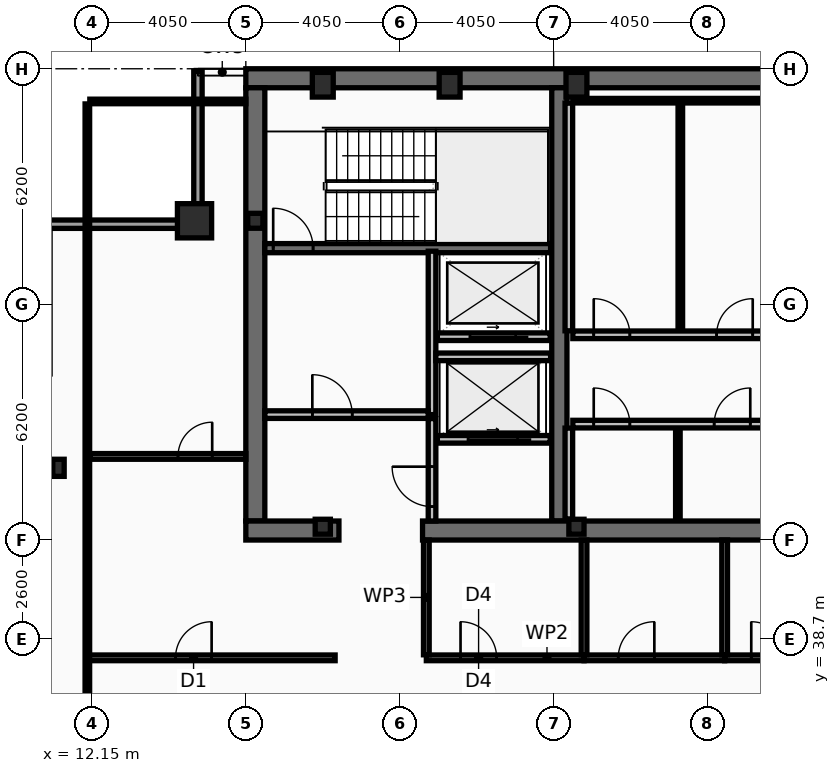
"""IFC4 building model, lengths in metres.
Left out: names, types, materials, properties, quantities, classifications, styles, units other than length and angle.
Written with IfcOpenShell. Run it as: python <this file> out.ifc"""

import sys

from ifc_helpers import new_model, si_unit, direction, frame, frame_2d, origin, origin_2d, place, context, subcontext, project, spatial, rectangle, hollow_rectangle, i_section, extrude, element, fill, save


model = new_model("IFC4")
c1 = context("Model", 3, precision=1e-05, world=origin(), true_north=direction((0.0, 1.0)))
c2 = subcontext(c1, "Body", "Model", "MODEL_VIEW")
j1 = project(units=[si_unit("LENGTHUNIT", "METRE"), si_unit("PLANEANGLEUNIT", "RADIAN")], contexts=[c1])
p1 = place(None, origin())
s1 = spatial("IfcSite", under=j1, at=p1, CompositionType="ELEMENT")
p2 = place(p1, origin())
s2 = spatial("IfcBuilding", under=s1, at=p2, CompositionType="ELEMENT")
p3 = place(p2, frame((0.0, 0.0, 325.4)))
s3 = spatial("IfcBuildingStorey", under=s2, at=p3, CompositionType="ELEMENT", Elevation=325.4)
p4 = place(p3, frame((16.2, 53.45, 0.0), z_axis=(0.0, 0.0, 1.0), x_axis=(1.0, 0.0, 0.0)))
e1 = element("IfcWall", 1, at=p4, inside=s3, PredefinedType="SHEAR", context=c2, shape_type="SweptSolid", body=[
    extrude(rectangle(XDim=40.5, YDim=0.5, at=frame_2d((20.25, 0.0))), origin(), (0.0, 0.0, 1.0), 3.44),
])
p5 = place(p3, frame((16.45, 41.8, 0.0), z_axis=(0.0, 0.0, 1.0), x_axis=(0.0, 1.0, 0.0)))
e2 = element("IfcWall", 2, at=p5, inside=s3, PredefinedType="SHEAR", context=c2, shape_type="SweptSolid", body=[
    extrude(rectangle(XDim=11.4, YDim=0.5, at=frame_2d((5.7, 0.0))), origin(), (0.0, 0.0, 1.0), 3.44),
])
p6 = place(p3, frame((24.45, 41.8, 0.0), z_axis=(0.0, 0.0, 1.0), x_axis=(0.0, 1.0, 0.0)))
e3 = element("IfcWall", 3, at=p6, inside=s3, PredefinedType="SHEAR", context=c2, shape_type="SweptSolid", body=[
    extrude(rectangle(XDim=11.4, YDim=0.4, at=frame_2d((5.7, 0.0))), origin(), (0.0, 0.0, 1.0), 3.44),
])
p7 = place(p3, frame((18.65, 41.55, 0.0), z_axis=(0.0, 0.0, 1.0), x_axis=(-1.0, 0.0, 0.0)))
e4 = element("IfcWall", 4, at=p7, inside=s3, PredefinedType="SHEAR", context=c2, shape_type="SweptSolid", body=[
    extrude(rectangle(XDim=2.45, YDim=0.5, at=frame_2d((1.225, 0.0))), origin(), (0.0, 0.0, 1.0), 3.44),
])
p8 = place(p3, frame((32.3, 41.55, 0.0), z_axis=(0.0, 0.0, 1.0), x_axis=(-1.0, 0.0, 0.0)))
e5 = element("IfcWall", 5, at=p8, inside=s3, PredefinedType="SHEAR", context=c2, shape_type="SweptSolid", body=[
    extrude(rectangle(XDim=11.45, YDim=0.5, at=frame_2d((5.725, 0.0))), origin(), (0.0, 0.0, 1.0), 3.44),
])
p9 = place(p3, frame((16.7, 48.98, 0.0), z_axis=(0.0, 0.0, 1.0), x_axis=(1.0, 0.0, 0.0)))
e6 = element("IfcWall", 6, at=p9, inside=s3, PredefinedType="SHEAR", context=c2, shape_type="SweptSolid", body=[
    extrude(rectangle(XDim=7.52, YDim=0.24, at=frame_2d((3.76, 0.0))), origin(), (0.0, 0.0, 1.0), 3.44),
])
p10 = place(p9, frame((0.22, 0.0, 0.0)))
e7 = element("IfcOpeningElement", 7, at=p10, cuts=e6, PredefinedType="OPENING", context=c2, shape_type="SweptSolid", body=[
    extrude(rectangle(XDim=1.05, YDim=2.15, at=frame_2d((0.525, 1.075))), frame((0.0, 0.13, 0.0), z_axis=(0.0, -1.0, 0.0), x_axis=(1.0, 0.0, 0.0)), (0.0, 0.0, 1.0), 0.26),
])
p11 = place(p3, frame((14.85, 49.7, 0.0), z_axis=(0.0, 0.0, 1.0), x_axis=(1.0, 0.0, 0.0)))
e8 = element("IfcColumn", 8, at=p11, inside=s3, PredefinedType="COLUMN", context=c2, shape_type="SweptSolid", body=[
    extrude(hollow_rectangle(XDim=0.9, YDim=0.9, WallThickness=0.05, at=origin_2d()), origin(), (0.0, 0.0, 1.0), 3.6),
])
for number, where, z_axis, x_axis in (
    (9, (18.225, 53.28, 0.0), (0.0, 0.0, 1.0), (1.0, 0.0, 0.0)),
    (10, (21.562, 53.28, 0.0), (0.0, 0.0, 1.0), (1.0, 0.0, 0.0)),
    (11, (24.9, 53.28, 0.0), (0.0, 0.0, 1.0), (1.0, 0.0, 0.0)),
):
    element("IfcColumn", number, at=place(p3, frame(where, z_axis=z_axis, x_axis=x_axis)), inside=s3, PredefinedType="COLUMN", context=c2, shape_type="SweptSolid", body=[
        extrude(hollow_rectangle(XDim=0.55, YDim=0.65, WallThickness=0.04, at=origin_2d()), origin(), (0.0, 0.0, 1.0), 3.6),
    ])
p12 = place(p3, frame((11.27, 43.2, 0.0), z_axis=(0.0, 0.0, 1.0), x_axis=(1.0, 0.0, 0.0)))
e12 = element("IfcColumn", 12, at=p12, inside=s3, PredefinedType="COLUMN", context=c2, shape_type="SweptSolid", body=[
    extrude(i_section(OverallWidth=0.3, OverallDepth=0.45, WebThickness=0.014, FlangeThickness=0.026, at=origin_2d()), origin(), (0.0, 0.0, 1.0), 3.6),
])
for number, where, z_axis, x_axis in (
    (13, (16.45, 49.7, 0.0), (0.0, 0.0, 1.0), (1.0, 0.0, 0.0)),
    (14, (18.225, 41.65, 0.0), (0.0, 0.0, 1.0), (1.0, 0.0, 0.0)),
    (15, (24.9, 41.65, 0.0), (0.0, 0.0, 1.0), (1.0, 0.0, 0.0)),
):
    element("IfcColumn", number, at=place(p3, frame(where, z_axis=z_axis, x_axis=x_axis)), inside=s3, PredefinedType="COLUMN", context=c2, shape_type="SweptSolid", body=[
        extrude(i_section(OverallWidth=0.399, OverallDepth=0.393, WebThickness=0.023, FlangeThickness=0.037, at=origin_2d()), origin(), (0.0, 0.0, 1.0), 3.6),
    ])
p13 = place(p3, frame((10.83, 49.61, 0.0), z_axis=(0.0, 0.0, 1.0), x_axis=(1.0, 0.0, 0.0)))
e16 = element("IfcWall", 16, at=p13, inside=s3, PredefinedType="SOLIDWALL", context=c2, shape_type="SweptSolid", body=[
    extrude(rectangle(XDim=4.22, YDim=0.22, at=frame_2d((2.11, 0.0))), origin(), (0.0, 0.0, 1.0), 2.88),
])
p14 = place(p3, frame((14.94, 49.72, 0.0), z_axis=(0.0, 0.0, 1.0), x_axis=(0.0, 1.0, 0.0)))
e17 = element("IfcWall", 17, at=p14, inside=s3, PredefinedType="SOLIDWALL", context=c2, shape_type="SweptSolid", body=[
    extrude(rectangle(XDim=3.91, YDim=0.22, at=frame_2d((1.955, 0.0))), origin(), (0.0, 0.0, 1.0), 2.88),
])
p15 = place(p3, frame((24.21, 43.95, 0.0), z_axis=(0.0, 0.0, 1.0), x_axis=(-1.0, 0.0, 0.0)))
e18 = element("IfcWall", 18, at=p15, inside=s3, PredefinedType="PARTITIONING", context=c2, shape_type="SweptSolid", body=[
    extrude(rectangle(XDim=2.97, YDim=0.2, at=frame_2d((1.485, 0.0))), origin(), (0.0, 0.0, 1.0), 3.44),
])
p16 = place(p15, frame((0.86, 0.0, 0.0)))
e19 = element("IfcOpeningElement", 19, at=p16, cuts=e18, PredefinedType="OPENING", context=c2, shape_type="SweptSolid", body=[
    extrude(rectangle(XDim=1.3, YDim=2.18, at=frame_2d((0.65, 1.09))), frame((0.0, 0.11, 0.0), z_axis=(0.0, -1.0, 0.0), x_axis=(1.0, 0.0, 0.0)), (0.0, 0.0, 1.0), 0.22),
])
p17 = place(p3, frame((24.21, 46.65, 0.0), z_axis=(0.0, 0.0, 1.0), x_axis=(-1.0, 0.0, 0.0)))
e20 = element("IfcWall", 20, at=p17, inside=s3, PredefinedType="PARTITIONING", context=c2, shape_type="SweptSolid", body=[
    extrude(rectangle(XDim=2.97, YDim=0.2, at=frame_2d((1.485, 0.0))), origin(), (0.0, 0.0, 1.0), 3.44),
])
p18 = place(p17, frame((0.91, 0.0, 0.0)))
e21 = element("IfcOpeningElement", 21, at=p18, cuts=e20, PredefinedType="OPENING", context=c2, shape_type="SweptSolid", body=[
    extrude(rectangle(XDim=1.2, YDim=2.18, at=frame_2d((0.6, 1.09))), frame((0.0, 0.11, 0.0), z_axis=(0.0, -1.0, 0.0), x_axis=(1.0, 0.0, 0.0)), (0.0, 0.0, 1.0), 0.22),
])
p19 = place(p3, frame((21.1, 44.6, 0.0), z_axis=(0.0, 0.0, 1.0), x_axis=(0.0, 1.0, 0.0)))
e22 = element("IfcWall", 22, at=p19, inside=s3, PredefinedType="PARTITIONING", context=c2, shape_type="SweptSolid", body=[
    extrude(rectangle(XDim=4.3, YDim=0.2, at=frame_2d((2.15, 0.0))), origin(), (0.0, 0.0, 1.0), 3.44),
])
p20 = place(p3, frame((16.7, 44.6, 0.0), z_axis=(0.0, 0.0, 1.0), x_axis=(1.0, 0.0, 0.0)))
e23 = element("IfcWall", 23, at=p20, inside=s3, PredefinedType="PARTITIONING", context=c2, shape_type="SweptSolid", body=[
    extrude(rectangle(XDim=4.3, YDim=0.2, at=frame_2d((2.15, 0.0))), origin(), (0.0, 0.0, 1.0), 3.44),
])
p21 = place(p20, frame((1.25, 0.0, 0.0)))
e24 = element("IfcOpeningElement", 24, at=p21, cuts=e23, PredefinedType="OPENING", context=c2, shape_type="SweptSolid", body=[
    extrude(rectangle(XDim=1.05, YDim=2.15, at=frame_2d((0.525, 1.075))), frame((0.0, 0.11, 0.0), z_axis=(0.0, -1.0, 0.0), x_axis=(1.0, 0.0, 0.0)), (0.0, 0.0, 1.0), 0.22),
])
p22 = place(p3, frame((21.2, 46.12, 0.0), z_axis=(0.0, 0.0, 1.0), x_axis=(1.0, 0.0, 0.0)))
e25 = element("IfcWall", 25, at=p22, inside=s3, PredefinedType="PARTITIONING", context=c2, shape_type="SweptSolid", body=[
    extrude(rectangle(XDim=3.02, YDim=0.2, at=frame_2d((1.51, 0.0))), origin(), (0.0, 0.0, 1.0), 3.44),
])
p23 = place(p3, frame((21.1, 41.8, 0.0), z_axis=(0.0, 0.0, 1.0), x_axis=(0.0, 1.0, 0.0)))
e26 = element("IfcWall", 26, at=p23, inside=s3, PredefinedType="PARTITIONING", context=c2, shape_type="SweptSolid", body=[
    extrude(rectangle(XDim=2.695, YDim=0.2, at=frame_2d((1.348, 0.0))), origin(), (0.0, 0.0, 1.0), 3.44),
])
p24 = place(p23, frame((0.38, 0.0, 0.0)))
e27 = element("IfcOpeningElement", 27, at=p24, cuts=e26, PredefinedType="OPENING", context=c2, shape_type="SweptSolid", body=[
    extrude(rectangle(XDim=1.05, YDim=2.15, at=frame_2d((0.525, 1.075))), frame((0.0, 0.11, 0.0), z_axis=(0.0, -1.0, 0.0), x_axis=(1.0, 0.0, 0.0)), (0.0, 0.0, 1.0), 0.22),
])
p25 = place(p3, frame((24.7, 46.805, 0.0), z_axis=(0.0, 0.0, 1.0), x_axis=(0.0, 1.0, 0.0)))
e28 = element("IfcWall", 28, at=p25, inside=s3, PredefinedType="PARTITIONING", context=c2, shape_type="SweptSolid", body=[
    extrude(rectangle(XDim=5.99, YDim=0.2, at=frame_2d((2.995, 0.0))), origin(), (0.0, 0.0, 1.0), 3.44),
])
p26 = place(p3, frame((24.805, 52.86, 0.0), z_axis=(0.0, 0.0, 1.0), x_axis=(1.0, 0.0, 0.0)))
e29 = element("IfcWall", 29, at=p26, inside=s3, PredefinedType="PARTITIONING", context=c2, shape_type="SweptSolid", body=[
    extrude(rectangle(XDim=7.51, YDim=0.12, at=frame_2d((3.755, 0.0))), origin(), (0.0, 0.0, 1.0), 3.44),
])
p27 = place(p3, frame((27.634, 46.805, 0.0), z_axis=(0.0, 0.0, 1.0), x_axis=(0.0, 1.0, 0.0)))
e30 = element("IfcWall", 30, at=p27, inside=s3, PredefinedType="PARTITIONING", context=c2, shape_type="SweptSolid", body=[
    extrude(rectangle(XDim=5.99, YDim=0.12, at=frame_2d((2.995, 0.0))), origin(), (0.0, 0.0, 1.0), 3.44),
])
p28 = place(p3, frame((24.805, 46.7, 0.0), z_axis=(0.0, 0.0, 1.0), x_axis=(1.0, 0.0, 0.0)))
e31 = element("IfcWall", 31, at=p28, inside=s3, PredefinedType="PARTITIONING", context=c2, shape_type="SweptSolid", body=[
    extrude(rectangle(XDim=7.51, YDim=0.2, at=frame_2d((3.755, 0.0))), origin(), (0.0, 0.0, 1.0), 3.44),
])
p29 = place(p28, frame((0.55, 0.0, 0.0)))
e32 = element("IfcOpeningElement", 32, at=p29, cuts=e31, PredefinedType="OPENING", context=c2, shape_type="SweptSolid", body=[
    extrude(rectangle(XDim=0.95, YDim=2.1, at=frame_2d((0.475, 1.05))), frame((0.0, 0.11, 0.0), z_axis=(0.0, -1.0, 0.0), x_axis=(1.0, 0.0, 0.0)), (0.0, 0.0, 1.0), 0.22),
])
p30 = place(p28, frame((3.784, 0.0, 0.0)))
e33 = element("IfcOpeningElement", 33, at=p30, cuts=e31, PredefinedType="OPENING", context=c2, shape_type="SweptSolid", body=[
    extrude(rectangle(XDim=0.95, YDim=2.1, at=frame_2d((0.475, 1.05))), frame((0.0, 0.11, 0.0), z_axis=(0.0, -1.0, 0.0), x_axis=(1.0, 0.0, 0.0)), (0.0, 0.0, 1.0), 0.22),
])
p31 = place(p3, frame((24.7, 41.85, 0.0), z_axis=(0.0, 0.0, 1.0), x_axis=(0.0, 1.0, 0.0)))
e34 = element("IfcWall", 34, at=p31, inside=s3, PredefinedType="PARTITIONING", context=c2, shape_type="SweptSolid", body=[
    extrude(rectangle(XDim=2.395, YDim=0.2, at=frame_2d((1.198, 0.0))), origin(), (0.0, 0.0, 1.0), 3.44),
])
p32 = place(p3, frame((27.569, 41.85, 0.0), z_axis=(0.0, 0.0, 1.0), x_axis=(0.0, 1.0, 0.0)))
e35 = element("IfcWall", 35, at=p32, inside=s3, PredefinedType="PARTITIONING", context=c2, shape_type="SweptSolid", body=[
    extrude(rectangle(XDim=2.395, YDim=0.12, at=frame_2d((1.198, 0.0))), origin(), (0.0, 0.0, 1.0), 3.44),
])
p33 = place(p3, frame((24.805, 44.35, 0.0), z_axis=(0.0, 0.0, 1.0), x_axis=(1.0, 0.0, 0.0)))
e36 = element("IfcWall", 36, at=p33, inside=s3, PredefinedType="PARTITIONING", context=c2, shape_type="SweptSolid", body=[
    extrude(rectangle(XDim=7.34, YDim=0.2, at=frame_2d((3.67, 0.0))), origin(), (0.0, 0.0, 1.0), 3.44),
])
p34 = place(p33, frame((0.55, 0.0, 0.0)))
e37 = element("IfcOpeningElement", 37, at=p34, cuts=e36, PredefinedType="OPENING", context=c2, shape_type="SweptSolid", body=[
    extrude(rectangle(XDim=0.95, YDim=2.1, at=frame_2d((0.475, 1.05))), frame((0.0, 0.11, 0.0), z_axis=(0.0, -1.0, 0.0), x_axis=(1.0, 0.0, 0.0)), (0.0, 0.0, 1.0), 0.22),
])
p35 = place(p33, frame((3.719, 0.0, 0.0)))
e38 = element("IfcOpeningElement", 38, at=p35, cuts=e36, PredefinedType="OPENING", context=c2, shape_type="SweptSolid", body=[
    extrude(rectangle(XDim=0.95, YDim=2.1, at=frame_2d((0.475, 1.05))), frame((0.0, 0.11, 0.0), z_axis=(0.0, -1.0, 0.0), x_axis=(1.0, 0.0, 0.0)), (0.0, 0.0, 1.0), 0.22),
])
p36 = place(p3, frame((20.95, 38.2, 0.0), z_axis=(0.0, 0.0, 1.0), x_axis=(1.0, 0.0, 0.0)))
e39 = element("IfcWall", 39, at=p36, inside=s3, PredefinedType="PARTITIONING", context=c2, shape_type="SweptSolid", body=[
    extrude(rectangle(XDim=4.15, YDim=0.15, at=frame_2d((2.075, 0.0))), origin(), (0.0, 0.0, 1.0), 2.83),
])
p37 = place(p36, frame((0.9, 0.0, 0.0)))
e40 = element("IfcOpeningElement", 40, at=p37, cuts=e39, PredefinedType="OPENING", context=c2, shape_type="SweptSolid", body=[
    extrude(rectangle(XDim=0.95, YDim=2.05, at=frame_2d((0.475, 1.025))), frame((0.0, 0.085, 0.0), z_axis=(0.0, -1.0, 0.0), x_axis=(1.0, 0.0, 0.0)), (0.0, 0.0, 1.0), 0.17),
])
p38 = place(p3, frame((25.1, 38.2, 0.0), z_axis=(0.0, 0.0, 1.0), x_axis=(1.0, 0.0, 0.0)))
e41 = element("IfcWall", 41, at=p38, inside=s3, PredefinedType="PARTITIONING", context=c2, shape_type="SweptSolid", body=[
    extrude(rectangle(XDim=3.7, YDim=0.15, at=frame_2d((1.85, 0.0))), origin(), (0.0, 0.0, 1.0), 2.83),
])
p39 = place(p38, frame((0.9, 0.0, 0.0)))
e42 = element("IfcOpeningElement", 42, at=p39, cuts=e41, PredefinedType="OPENING", context=c2, shape_type="SweptSolid", body=[
    extrude(rectangle(XDim=0.95, YDim=2.05, at=frame_2d((0.475, 1.025))), frame((0.0, 0.085, 0.0), z_axis=(0.0, -1.0, 0.0), x_axis=(1.0, 0.0, 0.0)), (0.0, 0.0, 1.0), 0.17),
])
p40 = place(p3, frame((28.8, 38.2, 0.0), z_axis=(0.0, 0.0, 1.0), x_axis=(1.0, 0.0, 0.0)))
e43 = element("IfcWall", 43, at=p40, inside=s3, PredefinedType="PARTITIONING", context=c2, shape_type="SweptSolid", body=[
    extrude(rectangle(XDim=3.38, YDim=0.15, at=frame_2d((1.69, 0.0))), origin(), (0.0, 0.0, 1.0), 3.44),
])
p41 = place(p40, frame((0.7, 0.0, 0.0)))
e44 = element("IfcOpeningElement", 44, at=p41, cuts=e43, PredefinedType="OPENING", context=c2, shape_type="SweptSolid", body=[
    extrude(rectangle(XDim=0.95, YDim=2.05, at=frame_2d((0.475, 1.025))), frame((0.0, 0.085, 0.0), z_axis=(0.0, -1.0, 0.0), x_axis=(1.0, 0.0, 0.0)), (0.0, 0.0, 1.0), 0.17),
])
p42 = place(p3, frame((20.95, 38.28, 0.0), z_axis=(0.0, 0.0, 1.0), x_axis=(0.0, 1.0, 0.0)))
e45 = element("IfcWall", 45, at=p42, inside=s3, PredefinedType="PARTITIONING", context=c2, shape_type="SweptSolid", body=[
    extrude(rectangle(XDim=3.02, YDim=0.15, at=frame_2d((1.51, 0.0))), origin(), (0.0, 0.0, 1.0), 3.44),
])
p43 = place(p3, frame((25.1, 38.28, 0.0), z_axis=(0.0, 0.0, 1.0), x_axis=(0.0, 1.0, 0.0)))
e46 = element("IfcWall", 46, at=p43, inside=s3, PredefinedType="PARTITIONING", context=c2, shape_type="SweptSolid", body=[
    extrude(rectangle(XDim=3.02, YDim=0.15, at=frame_2d((1.51, 0.0))), origin(), (0.0, 0.0, 1.0), 2.83),
])
p44 = place(p3, frame((28.8, 38.28, 0.0), z_axis=(0.0, 0.0, 1.0), x_axis=(0.0, 1.0, 0.0)))
e47 = element("IfcWall", 47, at=p44, inside=s3, PredefinedType="PARTITIONING", context=c2, shape_type="SweptSolid", body=[
    extrude(rectangle(XDim=3.02, YDim=0.15, at=frame_2d((1.51, 0.0))), origin(), (0.0, 0.0, 1.0), 3.44),
])
p45 = place(p3, frame((12.03, 38.2, 0.0), z_axis=(0.0, 0.0, 1.0), x_axis=(1.0, 0.0, 0.0)))
e48 = element("IfcWall", 48, at=p45, inside=s3, PredefinedType="PARTITIONING", context=c2, shape_type="SweptSolid", body=[
    extrude(rectangle(XDim=6.52, YDim=0.15, at=frame_2d((3.26, 0.0))), origin(), (0.0, 0.0, 1.0), 2.83),
])
p46 = place(p45, frame((2.32, 0.0, 0.0)))
e49 = element("IfcOpeningElement", 49, at=p46, cuts=e48, PredefinedType="OPENING", context=c2, shape_type="SweptSolid", body=[
    extrude(rectangle(XDim=0.95, YDim=2.05, at=frame_2d((0.475, 1.025))), frame((0.0, 0.085, 0.0), z_axis=(0.0, -1.0, 0.0), x_axis=(1.0, 0.0, 0.0)), (0.0, 0.0, 1.0), 0.17),
])
p47 = place(p3, frame((12.095, 43.5, 0.0), z_axis=(0.0, 0.0, 1.0), x_axis=(1.0, 0.0, 0.0)))
e50 = element("IfcWall", 50, at=p47, inside=s3, PredefinedType="PARTITIONING", context=c2, shape_type="SweptSolid", body=[
    extrude(rectangle(XDim=4.105, YDim=0.15, at=frame_2d((2.052, 0.0))), origin(), (0.0, 0.0, 1.0), 2.83),
])
p48 = place(p47, frame((2.32, 0.0, 0.0)))
e51 = element("IfcOpeningElement", 51, at=p48, cuts=e50, PredefinedType="OPENING", context=c2, shape_type="SweptSolid", body=[
    extrude(rectangle(XDim=0.9, YDim=2.05, at=frame_2d((0.45, 1.025))), frame((0.0, 0.085, 0.0), z_axis=(0.0, -1.0, 0.0), x_axis=(1.0, 0.0, 0.0)), (0.0, 0.0, 1.0), 0.17),
])
p49 = place(p3, frame((12.03, 10.665, 0.0), z_axis=(0.0, 0.0, 1.0), x_axis=(0.0, 1.0, 0.0)))
e52 = element("IfcWall", 52, at=p49, inside=s3, PredefinedType="PARTITIONING", context=c2, shape_type="SweptSolid", body=[
    extrude(rectangle(XDim=42.11, YDim=0.12, at=frame_2d((21.055, 0.0))), origin(), (0.0, 0.0, 1.0), 2.83),
])
p50 = place(p3, frame((12.095, 52.84, 0.0), z_axis=(0.0, 0.0, 1.0), x_axis=(1.0, 0.0, 0.0)))
e53 = element("IfcWall", 53, at=p50, inside=s3, PredefinedType="PARTITIONING", context=c2, shape_type="SweptSolid", body=[
    extrude(rectangle(XDim=4.105, YDim=0.12, at=frame_2d((2.052, 0.0))), origin(), (0.0, 0.0, 1.0), 3.44),
])
p51 = place(p10, origin())
e54 = element("IfcDoor", 54, at=p51, inside=s3, OperationType="SINGLE_SWING_LEFT", PredefinedType="DOOR", context=c2, shape_type="SweptSolid", body=[
    extrude(rectangle(XDim=1.05, YDim=2.15, at=frame_2d((0.525, 1.075))), frame((0.0, 0.025, 0.0), z_axis=(0.0, -1.0, 0.0), x_axis=(1.0, 0.0, 0.0)), (0.0, 0.0, 1.0), 0.05),
])
fill(e7, e54)
p52 = place(p16, origin())
e55 = element("IfcDoor", 55, at=p52, inside=s3, OperationType="SLIDING_TO_LEFT", PredefinedType="DOOR", context=c2, shape_type="SweptSolid", body=[
    extrude(rectangle(XDim=1.3, YDim=2.18, at=frame_2d((0.65, 1.09))), frame((0.0, 0.025, 0.0), z_axis=(0.0, -1.0, 0.0), x_axis=(1.0, 0.0, 0.0)), (0.0, 0.0, 1.0), 0.05),
])
fill(e19, e55)
p53 = place(p18, origin())
e56 = element("IfcDoor", 56, at=p53, inside=s3, OperationType="SLIDING_TO_LEFT", PredefinedType="DOOR", context=c2, shape_type="SweptSolid", body=[
    extrude(rectangle(XDim=1.2, YDim=2.18, at=frame_2d((0.6, 1.09))), frame((0.0, 0.025, 0.0), z_axis=(0.0, -1.0, 0.0), x_axis=(1.0, 0.0, 0.0)), (0.0, 0.0, 1.0), 0.05),
])
fill(e21, e56)
p54 = place(p21, origin())
e57 = element("IfcDoor", 57, at=p54, inside=s3, OperationType="SINGLE_SWING_LEFT", PredefinedType="DOOR", context=c2, shape_type="SweptSolid", body=[
    extrude(rectangle(XDim=1.05, YDim=2.15, at=frame_2d((0.525, 1.075))), frame((0.0, 0.025, 0.0), z_axis=(0.0, -1.0, 0.0), x_axis=(1.0, 0.0, 0.0)), (0.0, 0.0, 1.0), 0.05),
])
fill(e24, e57)
p55 = place(p24, origin())
e58 = element("IfcDoor", 58, at=p55, inside=s3, OperationType="SINGLE_SWING_RIGHT", PredefinedType="DOOR", context=c2, shape_type="SweptSolid", body=[
    extrude(rectangle(XDim=1.05, YDim=2.15, at=frame_2d((0.525, 1.075))), frame((0.0, 0.025, 0.0), z_axis=(0.0, -1.0, 0.0), x_axis=(1.0, 0.0, 0.0)), (0.0, 0.0, 1.0), 0.05),
])
fill(e27, e58)
p56 = place(p29, origin())
e59 = element("IfcDoor", 59, at=p56, inside=s3, OperationType="SINGLE_SWING_LEFT", PredefinedType="DOOR", context=c2, shape_type="SweptSolid", body=[
    extrude(rectangle(XDim=0.95, YDim=2.1, at=frame_2d((0.475, 1.05))), frame((0.0, 0.025, 0.0), z_axis=(0.0, -1.0, 0.0), x_axis=(1.0, 0.0, 0.0)), (0.0, 0.0, 1.0), 0.05),
])
fill(e32, e59)
p57 = place(p30, origin())
e60 = element("IfcDoor", 60, at=p57, inside=s3, OperationType="SINGLE_SWING_RIGHT", PredefinedType="DOOR", context=c2, shape_type="SweptSolid", body=[
    extrude(rectangle(XDim=0.95, YDim=2.1, at=frame_2d((0.475, 1.05))), frame((0.0, 0.025, 0.0), z_axis=(0.0, -1.0, 0.0), x_axis=(1.0, 0.0, 0.0)), (0.0, 0.0, 1.0), 0.05),
])
fill(e33, e60)
p58 = place(p34, origin())
e61 = element("IfcDoor", 61, at=p58, inside=s3, OperationType="SINGLE_SWING_LEFT", PredefinedType="DOOR", context=c2, shape_type="SweptSolid", body=[
    extrude(rectangle(XDim=0.95, YDim=2.1, at=frame_2d((0.475, 1.05))), frame((0.0, 0.025, 0.0), z_axis=(0.0, -1.0, 0.0), x_axis=(1.0, 0.0, 0.0)), (0.0, 0.0, 1.0), 0.05),
])
fill(e37, e61)
p59 = place(p35, origin())
e62 = element("IfcDoor", 62, at=p59, inside=s3, OperationType="SINGLE_SWING_RIGHT", PredefinedType="DOOR", context=c2, shape_type="SweptSolid", body=[
    extrude(rectangle(XDim=0.95, YDim=2.1, at=frame_2d((0.475, 1.05))), frame((0.0, 0.025, 0.0), z_axis=(0.0, -1.0, 0.0), x_axis=(1.0, 0.0, 0.0)), (0.0, 0.0, 1.0), 0.05),
])
fill(e38, e62)
p60 = place(p37, origin())
e63 = element("IfcDoor", 63, at=p60, inside=s3, OperationType="SINGLE_SWING_LEFT", PredefinedType="DOOR", context=c2, shape_type="SweptSolid", body=[
    extrude(rectangle(XDim=0.95, YDim=2.05, at=frame_2d((0.475, 1.025))), frame((0.0, 0.025, 0.0), z_axis=(0.0, -1.0, 0.0), x_axis=(1.0, 0.0, 0.0)), (0.0, 0.0, 1.0), 0.05),
])
fill(e40, e63)
p61 = place(p39, origin())
e64 = element("IfcDoor", 64, at=p61, inside=s3, OperationType="SINGLE_SWING_RIGHT", PredefinedType="DOOR", context=c2, shape_type="SweptSolid", body=[
    extrude(rectangle(XDim=0.95, YDim=2.05, at=frame_2d((0.475, 1.025))), frame((0.0, 0.025, 0.0), z_axis=(0.0, -1.0, 0.0), x_axis=(1.0, 0.0, 0.0)), (0.0, 0.0, 1.0), 0.05),
])
fill(e42, e64)
p62 = place(p41, origin())
e65 = element("IfcDoor", 65, at=p62, inside=s3, OperationType="SINGLE_SWING_LEFT", PredefinedType="DOOR", context=c2, shape_type="SweptSolid", body=[
    extrude(rectangle(XDim=0.95, YDim=2.05, at=frame_2d((0.475, 1.025))), frame((0.0, 0.025, 0.0), z_axis=(0.0, -1.0, 0.0), x_axis=(1.0, 0.0, 0.0)), (0.0, 0.0, 1.0), 0.05),
])
fill(e44, e65)
p63 = place(p46, origin())
e66 = element("IfcDoor", 66, at=p63, inside=s3, OperationType="SINGLE_SWING_RIGHT", PredefinedType="DOOR", context=c2, shape_type="SweptSolid", body=[
    extrude(rectangle(XDim=0.95, YDim=2.05, at=frame_2d((0.475, 1.025))), frame((0.0, 0.025, 0.0), z_axis=(0.0, -1.0, 0.0), x_axis=(1.0, 0.0, 0.0)), (0.0, 0.0, 1.0), 0.05),
])
fill(e49, e66)
p64 = place(p48, origin())
e67 = element("IfcDoor", 67, at=p64, inside=s3, OperationType="SINGLE_SWING_RIGHT", PredefinedType="DOOR", context=c2, shape_type="SweptSolid", body=[
    extrude(rectangle(XDim=0.9, YDim=2.05, at=frame_2d((0.45, 1.025))), frame((0.0, 0.025, 0.0), z_axis=(0.0, -1.0, 0.0), x_axis=(1.0, 0.0, 0.0)), (0.0, 0.0, 1.0), 0.05),
])
fill(e51, e67)
save(model, sys.argv[1])
